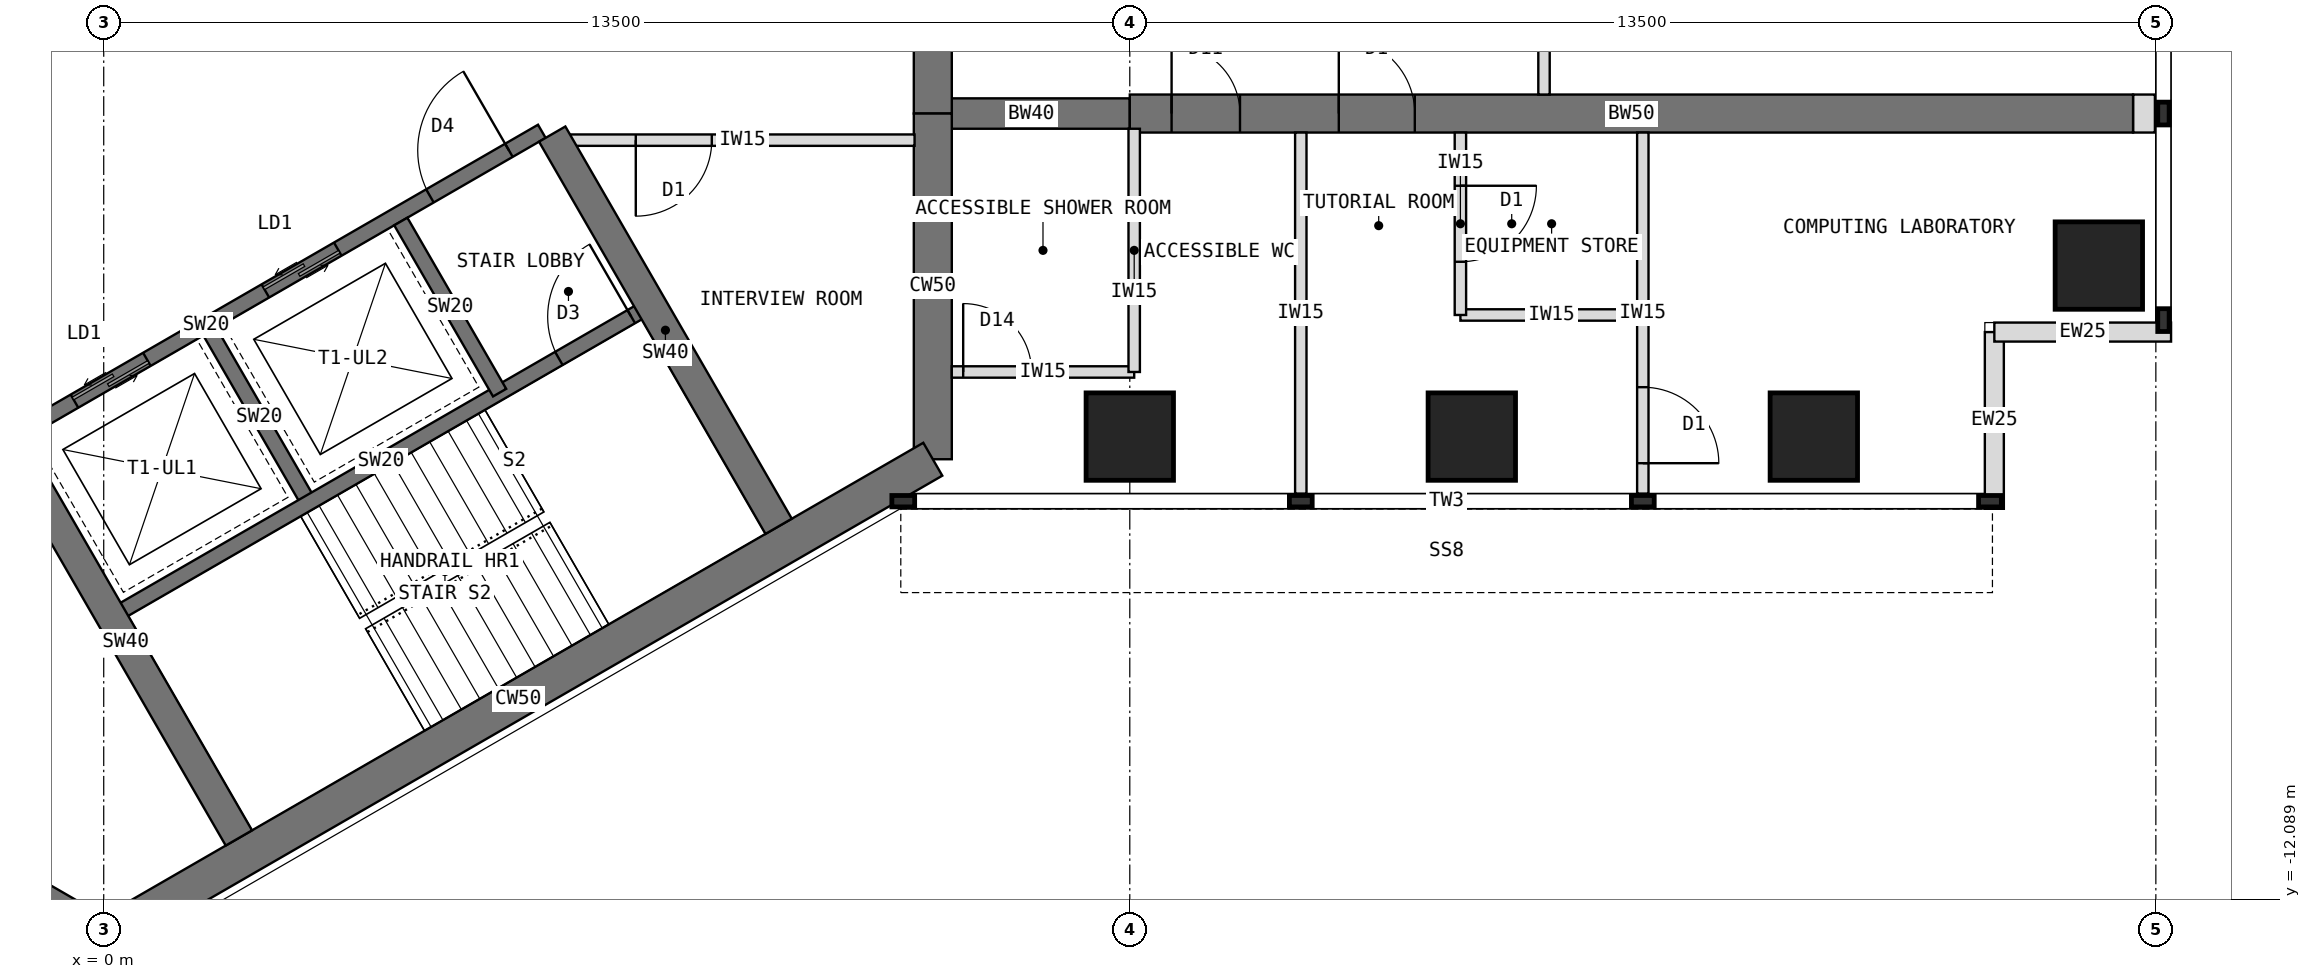
"""IFC4 building model, lengths in metres.
Left out: names, types, materials, properties, quantities, classifications, styles, units other than length and angle.
Written with IfcOpenShell. Run it as: python <this file> out.ifc"""

import sys

from ifc_helpers import new_model, si_unit, direction, frame, frame_2d, origin, origin_2d, place, context, subcontext, project, spatial, rectangle, extrude, element, fill, save


model = new_model("IFC4")
c1 = context("Model", 3, precision=1e-05, world=origin(), true_north=direction((0.0, 1.0)))
c2 = subcontext(c1, "Body", "Model", "MODEL_VIEW")
j1 = project(units=[si_unit("LENGTHUNIT", "METRE"), si_unit("PLANEANGLEUNIT", "RADIAN")], contexts=[c1])
p1 = place(None, origin())
s1 = spatial("IfcSite", under=j1, at=p1, CompositionType="ELEMENT")
p2 = place(p1, origin())
s2 = spatial("IfcBuilding", under=s1, at=p2, CompositionType="ELEMENT")
p3 = place(p2, frame((0.0, 0.0, 206.5)))
s3 = spatial("IfcBuildingStorey", under=s2, at=p3, CompositionType="ELEMENT", Elevation=206.5)
p4 = place(p3, frame((10.908, -6.298, 0.0), z_axis=(0.0, 0.0, 1.0), x_axis=(0.0, 1.0, 0.0)))
e1 = element("IfcWall", 1, at=p4, inside=s3, PredefinedType="SHEAR", context=c2, shape_type="SweptSolid", body=[
    extrude(rectangle(XDim=4.548, YDim=0.5, at=frame_2d((2.274, 0.0))), origin(), (0.0, 0.0, 1.0), 4.0),
])
p5 = place(p3, frame((10.908, -1.75, 0.0), z_axis=(0.0, 0.0, 1.0), x_axis=(0.0, 1.0, 0.0)))
e2 = element("IfcWall", 2, at=p5, inside=s3, PredefinedType="SHEAR", context=c2, shape_type="SweptSolid", body=[
    extrude(rectangle(XDim=3.5, YDim=0.5, at=frame_2d((1.75, 0.0))), origin(), (0.0, 0.0, 1.0), 4.0),
])
p6 = place(p5, frame((0.85, 0.0, 0.0)))
e3 = element("IfcOpeningElement", 3, at=p6, cuts=e2, PredefinedType="OPENING", context=c2, shape_type="SweptSolid", body=[
    extrude(rectangle(XDim=1.8, YDim=2.1, at=frame_2d((0.9, 1.05))), frame((0.0, 0.26, 0.0), z_axis=(0.0, -1.0, 0.0), x_axis=(1.0, 0.0, 0.0)), (0.0, 0.0, 1.0), 0.52),
])
p7 = place(p3, frame((-3.939, -10.322, 0.0), z_axis=(0.0, 0.0, 1.0), x_axis=(0.866011268655, -0.500024481964, 0.0)))
e4 = element("IfcWall", 4, at=p7, inside=s3, PredefinedType="SHEAR", context=c2, shape_type="SweptSolid", body=[
    extrude(rectangle(XDim=4.548, YDim=0.5, at=frame_2d((2.274, 0.0))), origin(), (0.0, 0.0, 1.0), 4.0),
])
p8 = place(p3, frame((0.0, -12.596, 0.0), z_axis=(0.0, 0.0, 1.0), x_axis=(0.866021940709, 0.500005998175, 0.0)))
e5 = element("IfcWall", 5, at=p8, inside=s3, PredefinedType="SHEAR", context=c2, shape_type="SweptSolid", body=[
    extrude(rectangle(XDim=12.596, YDim=0.5, at=frame_2d((6.298, 0.0))), origin(), (0.0, 0.0, 1.0), 4.0),
])
p9 = place(p3, frame((10.908, -1.75, 0.0), z_axis=(0.0, 0.0, 1.0), x_axis=(1.0, 0.0, 0.0)))
e6 = element("IfcWall", 6, at=p9, inside=s3, PredefinedType="SHEAR", context=c2, shape_type="SweptSolid", body=[
    extrude(rectangle(XDim=2.592, YDim=0.4, at=frame_2d((1.296, 0.0))), origin(), (0.0, 0.0, 1.0), 4.0),
])
p10 = place(p3, frame((13.5, -1.75, 0.0), z_axis=(0.0, 0.0, 1.0), x_axis=(1.0, 0.0, 0.0)))
e7 = element("IfcWall", 7, at=p10, inside=s3, PredefinedType="SHEAR", context=c2, shape_type="SweptSolid", body=[
    extrude(rectangle(XDim=13.2, YDim=0.5, at=frame_2d((6.6, 0.0))), origin(), (0.0, 0.0, 1.0), 4.0),
])
p11 = place(p10, frame((0.55, 0.0, 0.0)))
e8 = element("IfcOpeningElement", 8, at=p11, cuts=e7, PredefinedType="OPENING", context=c2, shape_type="SweptSolid", body=[
    extrude(rectangle(XDim=0.9, YDim=2.1, at=frame_2d((0.45, 1.05))), frame((0.0, 0.26, 0.0), z_axis=(0.0, -1.0, 0.0), x_axis=(1.0, 0.0, 0.0)), (0.0, 0.0, 1.0), 0.52),
])
p12 = place(p10, frame((2.75, 0.0, 0.0)))
e9 = element("IfcOpeningElement", 9, at=p12, cuts=e7, PredefinedType="OPENING", context=c2, shape_type="SweptSolid", body=[
    extrude(rectangle(XDim=1.0, YDim=2.1, at=frame_2d((0.5, 1.05))), frame((0.0, 0.26, 0.0), z_axis=(0.0, -1.0, 0.0), x_axis=(1.0, 0.0, 0.0)), (0.0, 0.0, 1.0), 0.52),
])
for number, where, z_axis, x_axis in (
    (10, (13.5, -6.0, 0.0), (0.0, 0.0, 1.0), (1.0, 0.0, 0.0)),
    (11, (18.0, -6.0, 0.0), (0.0, 0.0, 1.0), (1.0, 0.0, 0.0)),
    (12, (22.5, -6.0, 0.0), (0.0, 0.0, 1.0), (1.0, 0.0, 0.0)),
    (13, (26.25, -3.75, 0.0), (0.0, 0.0, 1.0), (1.0, 0.0, 0.0)),
):
    element("IfcColumn", number, at=place(p3, frame(where, z_axis=z_axis, x_axis=x_axis)), inside=s3, PredefinedType="COLUMN", context=c2, shape_type="SweptSolid", body=[
        extrude(rectangle(XDim=1.15, YDim=1.15, at=origin_2d()), origin(), (0.0, 0.0, 1.0), 4.0),
    ])
for number, where, z_axis, x_axis in (
    (14, (24.875, -6.95, 0.0), (0.0, 0.0, 1.0), (0.0, 1.0, 0.0)),
    (15, (24.875, -4.625, 0.0), (0.0, 0.0, 1.0), (1.0, 0.0, 0.0)),
):
    element("IfcWall", number, at=place(p3, frame(where, z_axis=z_axis, x_axis=x_axis)), inside=s3, PredefinedType="STANDARD", context=c2, shape_type="SweptSolid", body=[
        extrude(rectangle(XDim=2.325, YDim=0.25, at=frame_2d((1.163, 0.0))), origin(), (0.0, 0.0, 1.0), 3.8),
    ])
p13 = place(p3, frame((26.7, -1.75, 0.0), z_axis=(0.0, 0.0, 1.0), x_axis=(1.0, 0.0, 0.0)))
e16 = element("IfcWall", 16, at=p13, inside=s3, PredefinedType="PARTITIONING", context=c2, shape_type="SweptSolid", body=[
    extrude(rectangle(XDim=0.288, YDim=0.5, at=frame_2d((0.144, 0.0))), origin(), (0.0, 0.0, 1.0), 3.8),
])
p14 = place(p3, frame((-1.164, -5.984, 0.0), z_axis=(0.0, 0.0, 1.0), x_axis=(0.866026010844, 0.49999894854, 0.0)))
e17 = element("IfcWall", 17, at=p14, inside=s3, PredefinedType="SHEAR", context=c2, shape_type="SweptSolid", body=[
    extrude(rectangle(XDim=8.0, YDim=0.2, at=frame_2d((4.0, 0.0))), origin(), (0.0, 0.0, 1.0), 4.0),
])
p15 = place(p14, frame((6.3, 0.0, 0.0)))
e18 = element("IfcOpeningElement", 18, at=p15, cuts=e17, PredefinedType="OPENING", context=c2, shape_type="SweptSolid", body=[
    extrude(rectangle(XDim=1.2, YDim=2.1, at=frame_2d((0.6, 1.05))), frame((0.0, 0.11, 0.0), z_axis=(0.0, -1.0, 0.0), x_axis=(1.0, 0.0, 0.0)), (0.0, 0.0, 1.0), 0.22),
])
p16 = place(p14, frame((0.9, 0.0, 0.0)))
e19 = element("IfcOpeningElement", 19, at=p16, cuts=e17, PredefinedType="OPENING", context=c2, shape_type="SweptSolid", body=[
    extrude(rectangle(XDim=1.1, YDim=2.2, at=frame_2d((0.55, 1.1))), frame((0.0, 0.11, 0.0), z_axis=(0.0, -1.0, 0.0), x_axis=(1.0, 0.0, 0.0)), (0.0, 0.0, 1.0), 0.22),
])
p17 = place(p14, frame((3.8, 0.0, 0.0)))
e20 = element("IfcOpeningElement", 20, at=p17, cuts=e17, PredefinedType="OPENING", context=c2, shape_type="SweptSolid", body=[
    extrude(rectangle(XDim=1.1, YDim=2.2, at=frame_2d((0.55, 1.1))), frame((0.0, 0.11, 0.0), z_axis=(0.0, -1.0, 0.0), x_axis=(1.0, 0.0, 0.0)), (0.0, 0.0, 1.0), 0.22),
])
p18 = place(p3, frame((1.397, -4.62, 0.0), z_axis=(0.0, 0.0, 1.0), x_axis=(0.499936506574, -0.866062058628, 0.0)))
e21 = element("IfcWall", 21, at=p18, inside=s3, PredefinedType="SHEAR", context=c2, shape_type="SweptSolid", body=[
    extrude(rectangle(XDim=2.6, YDim=0.2, at=frame_2d((1.3, 0.0))), origin(), (0.0, 0.0, 1.0), 4.0),
])
p19 = place(p3, frame((3.909, -3.17, 0.0), z_axis=(0.0, 0.0, 1.0), x_axis=(0.49997716683, -0.86603858612, 0.0)))
e22 = element("IfcWall", 22, at=p19, inside=s3, PredefinedType="SHEAR", context=c2, shape_type="SweptSolid", body=[
    extrude(rectangle(XDim=2.6, YDim=0.2, at=frame_2d((1.3, 0.0))), origin(), (0.0, 0.0, 1.0), 4.0),
])
p20 = place(p3, frame((0.186, -8.322, 0.0), z_axis=(0.0, 0.0, 1.0), x_axis=(0.866026010844, 0.49999894854, 0.0)))
e23 = element("IfcWall", 23, at=p20, inside=s3, PredefinedType="SHEAR", context=c2, shape_type="SweptSolid", body=[
    extrude(rectangle(XDim=8.0, YDim=0.2, at=frame_2d((4.0, 0.0))), origin(), (0.0, 0.0, 1.0), 4.0),
])
p21 = place(p20, frame((6.7, 0.0, 0.0)))
e24 = element("IfcOpeningElement", 24, at=p21, cuts=e23, PredefinedType="OPENING", context=c2, shape_type="SweptSolid", body=[
    extrude(rectangle(XDim=1.1, YDim=2.1, at=frame_2d((0.55, 1.05))), frame((0.0, 0.11, 0.0), z_axis=(0.0, -1.0, 0.0), x_axis=(1.0, 0.0, 0.0)), (0.0, 0.0, 1.0), 0.22),
])
p22 = place(p3, frame((5.901, -2.02, 0.0), z_axis=(0.0, 0.0, 1.0), x_axis=(0.500003832394, -0.86602319114, 0.0)))
e25 = element("IfcWall", 25, at=p22, inside=s3, PredefinedType="SHEAR", context=c2, shape_type="SweptSolid", body=[
    extrude(rectangle(XDim=5.958, YDim=0.4, at=frame_2d((2.979, 0.0))), origin(), (0.0, 0.0, 1.0), 4.0),
])
p23 = place(p3, frame((-1.201, -6.12, 0.0), z_axis=(0.0, 0.0, 1.0), x_axis=(0.500021575205, -0.866012946976, 0.0)))
e26 = element("IfcWall", 26, at=p23, inside=s3, PredefinedType="SHEAR", context=c2, shape_type="SweptSolid", body=[
    extrude(rectangle(XDim=5.958, YDim=0.4, at=frame_2d((2.979, 0.0))), origin(), (0.0, 0.0, 1.0), 4.0),
])
p24 = place(p3, frame((15.75, -2.0, 0.0), z_axis=(0.0, 0.0, 1.0), x_axis=(0.0, -1.0, 0.0)))
e27 = element("IfcWall", 27, at=p24, inside=s3, PredefinedType="PARTITIONING", context=c2, shape_type="SweptSolid", body=[
    extrude(rectangle(XDim=4.75, YDim=0.15, at=frame_2d((2.375, 0.0))), origin(), (0.0, 0.0, 1.0), 3.8),
])
p25 = place(p3, frame((20.25, -2.0, 0.0), z_axis=(0.0, 0.0, 1.0), x_axis=(0.0, -1.0, 0.0)))
e28 = element("IfcWall", 28, at=p25, inside=s3, PredefinedType="PARTITIONING", context=c2, shape_type="SweptSolid", body=[
    extrude(rectangle(XDim=4.75, YDim=0.15, at=frame_2d((2.375, 0.0))), origin(), (0.0, 0.0, 1.0), 3.8),
])
p26 = place(p25, frame((3.35, 0.0, 0.0)))
e29 = element("IfcOpeningElement", 29, at=p26, cuts=e28, PredefinedType="OPENING", context=c2, shape_type="SweptSolid", body=[
    extrude(rectangle(XDim=1.0, YDim=2.1, at=frame_2d((0.5, 1.05))), frame((0.0, 0.085, 0.0), z_axis=(0.0, -1.0, 0.0), x_axis=(1.0, 0.0, 0.0)), (0.0, 0.0, 1.0), 0.17),
])
p27 = place(p3, frame((17.85, -4.4, 0.0), z_axis=(0.0, 0.0, 1.0), x_axis=(1.0, 0.0, 0.0)))
e30 = element("IfcWall", 30, at=p27, inside=s3, PredefinedType="PARTITIONING", context=c2, shape_type="SweptSolid", body=[
    extrude(rectangle(XDim=2.4, YDim=0.15, at=frame_2d((1.2, 0.0))), origin(), (0.0, 0.0, 1.0), 3.8),
])
p28 = place(p3, frame((17.85, -2.0, 0.0), z_axis=(0.0, 0.0, 1.0), x_axis=(0.0, -1.0, 0.0)))
e31 = element("IfcWall", 31, at=p28, inside=s3, PredefinedType="PARTITIONING", context=c2, shape_type="SweptSolid", body=[
    extrude(rectangle(XDim=2.4, YDim=0.15, at=frame_2d((1.2, 0.0))), origin(), (0.0, 0.0, 1.0), 3.8),
])
p29 = place(p28, frame((0.7, 0.0, 0.0)))
e32 = element("IfcOpeningElement", 32, at=p29, cuts=e31, PredefinedType="OPENING", context=c2, shape_type="SweptSolid", body=[
    extrude(rectangle(XDim=1.0, YDim=2.1, at=frame_2d((0.5, 1.05))), frame((0.0, 0.085, 0.0), z_axis=(0.0, -1.0, 0.0), x_axis=(1.0, 0.0, 0.0)), (0.0, 0.0, 1.0), 0.17),
])
p30 = place(p3, frame((11.158, -5.15, 0.0), z_axis=(0.0, 0.0, 1.0), x_axis=(1.0, 0.0, 0.0)))
e33 = element("IfcWall", 33, at=p30, inside=s3, PredefinedType="PARTITIONING", context=c2, shape_type="SweptSolid", body=[
    extrude(rectangle(XDim=2.4, YDim=0.15, at=frame_2d((1.2, 0.0))), origin(), (0.0, 0.0, 1.0), 3.8),
])
p31 = place(p30, frame((0.15, 0.0, 0.0)))
e34 = element("IfcOpeningElement", 34, at=p31, cuts=e33, PredefinedType="OPENING", context=c2, shape_type="SweptSolid", body=[
    extrude(rectangle(XDim=0.9, YDim=2.1, at=frame_2d((0.45, 1.05))), frame((0.0, 0.085, 0.0), z_axis=(0.0, -1.0, 0.0), x_axis=(1.0, 0.0, 0.0)), (0.0, 0.0, 1.0), 0.17),
])
p32 = place(p3, frame((13.558, -1.95, 0.0), z_axis=(0.0, 0.0, 1.0), x_axis=(0.0, -1.0, 0.0)))
e35 = element("IfcWall", 35, at=p32, inside=s3, PredefinedType="PARTITIONING", context=c2, shape_type="SweptSolid", body=[
    extrude(rectangle(XDim=3.2, YDim=0.15, at=frame_2d((1.6, 0.0))), origin(), (0.0, 0.0, 1.0), 3.267),
])
p33 = place(p3, frame((10.668, -2.1, 0.0), z_axis=(0.0, 0.0, 1.0), x_axis=(-1.0, 0.0, 0.0)))
e36 = element("IfcWall", 36, at=p33, inside=s3, PredefinedType="PARTITIONING", context=c2, shape_type="SweptSolid", body=[
    extrude(rectangle(XDim=4.526, YDim=0.15, at=frame_2d((2.263, 0.0))), origin(), (0.0, 0.0, 1.0), 3.8),
])
p34 = place(p33, frame((2.668, 0.0, 0.0)))
e37 = element("IfcOpeningElement", 37, at=p34, cuts=e36, PredefinedType="OPENING", context=c2, shape_type="SweptSolid", body=[
    extrude(rectangle(XDim=1.0, YDim=2.1, at=frame_2d((0.5, 1.05))), frame((0.0, 0.085, 0.0), z_axis=(0.0, -1.0, 0.0), x_axis=(1.0, 0.0, 0.0)), (0.0, 0.0, 1.0), 0.17),
])
p35 = place(p3, frame((18.95, -1.5, 0.0), z_axis=(0.0, 0.0, 1.0), x_axis=(0.0, 1.0, 0.0)))
e38 = element("IfcWall", 38, at=p35, inside=s3, PredefinedType="PARTITIONING", context=c2, shape_type="SweptSolid", body=[
    extrude(rectangle(XDim=3.0, YDim=0.15, at=frame_2d((1.5, 0.0))), origin(), (0.0, 0.0, 1.0), 3.8),
])
p36 = place(p35, frame((1.0, 0.0, 0.0)))
e39 = element("IfcOpeningElement", 39, at=p36, cuts=e38, PredefinedType="OPENING", context=c2, shape_type="SweptSolid", body=[
    extrude(rectangle(XDim=1.0, YDim=2.1, at=frame_2d((0.5, 1.05))), frame((0.0, 0.085, 0.0), z_axis=(0.0, -1.0, 0.0), x_axis=(1.0, 0.0, 0.0)), (0.0, 0.0, 1.0), 0.17),
])
p37 = place(p15, origin())
e40 = element("IfcDoor", 40, at=p37, inside=s3, OperationType="SINGLE_SWING_RIGHT", PredefinedType="DOOR", context=c2, shape_type="SweptSolid", body=[
    extrude(rectangle(XDim=1.2, YDim=2.1, at=frame_2d((0.6, 1.05))), frame((0.0, 0.025, 0.0), z_axis=(0.0, -1.0, 0.0), x_axis=(1.0, 0.0, 0.0)), (0.0, 0.0, 1.0), 0.05),
])
fill(e18, e40)
p38 = place(p16, origin())
e41 = element("IfcDoor", 41, at=p38, inside=s3, OperationType="DOUBLE_DOOR_SLIDING", PredefinedType="DOOR", context=c2, shape_type="SweptSolid", body=[
    extrude(rectangle(XDim=1.1, YDim=2.2, at=frame_2d((0.55, 1.1))), frame((0.0, 0.025, 0.0), z_axis=(0.0, -1.0, 0.0), x_axis=(1.0, 0.0, 0.0)), (0.0, 0.0, 1.0), 0.05),
])
fill(e19, e41)
p39 = place(p17, origin())
e42 = element("IfcDoor", 42, at=p39, inside=s3, OperationType="DOUBLE_DOOR_SLIDING", PredefinedType="DOOR", context=c2, shape_type="SweptSolid", body=[
    extrude(rectangle(XDim=1.1, YDim=2.2, at=frame_2d((0.55, 1.1))), frame((0.0, 0.025, 0.0), z_axis=(0.0, -1.0, 0.0), x_axis=(1.0, 0.0, 0.0)), (0.0, 0.0, 1.0), 0.05),
])
fill(e20, e42)
p40 = place(p21, origin())
e43 = element("IfcDoor", 43, at=p40, inside=s3, OperationType="SINGLE_SWING_RIGHT", PredefinedType="DOOR", context=c2, shape_type="SweptSolid", body=[
    extrude(rectangle(XDim=1.1, YDim=2.1, at=frame_2d((0.55, 1.05))), frame((0.0, 0.025, 0.0), z_axis=(0.0, -1.0, 0.0), x_axis=(1.0, 0.0, 0.0)), (0.0, 0.0, 1.0), 0.05),
])
fill(e24, e43)
p41 = place(p26, origin())
e44 = element("IfcDoor", 44, at=p41, inside=s3, OperationType="SINGLE_SWING_RIGHT", PredefinedType="DOOR", context=c2, shape_type="SweptSolid", body=[
    extrude(rectangle(XDim=1.0, YDim=2.1, at=frame_2d((0.5, 1.05))), frame((0.0, 0.025, 0.0), z_axis=(0.0, -1.0, 0.0), x_axis=(1.0, 0.0, 0.0)), (0.0, 0.0, 1.0), 0.05),
])
fill(e29, e44)
p42 = place(p29, origin())
e45 = element("IfcDoor", 45, at=p42, inside=s3, OperationType="SINGLE_SWING_LEFT", PredefinedType="DOOR", context=c2, shape_type="SweptSolid", body=[
    extrude(rectangle(XDim=1.0, YDim=2.1, at=frame_2d((0.5, 1.05))), frame((0.0, 0.025, 0.0), z_axis=(0.0, -1.0, 0.0), x_axis=(1.0, 0.0, 0.0)), (0.0, 0.0, 1.0), 0.05),
])
fill(e32, e45)
p43 = place(p31, origin())
e46 = element("IfcDoor", 46, at=p43, inside=s3, OperationType="SINGLE_SWING_LEFT", PredefinedType="DOOR", context=c2, shape_type="SweptSolid", body=[
    extrude(rectangle(XDim=0.9, YDim=2.1, at=frame_2d((0.45, 1.05))), frame((0.0, 0.025, 0.0), z_axis=(0.0, -1.0, 0.0), x_axis=(1.0, 0.0, 0.0)), (0.0, 0.0, 1.0), 0.05),
])
fill(e34, e46)
p44 = place(p34, origin())
e47 = element("IfcDoor", 47, at=p44, inside=s3, OperationType="SINGLE_SWING_RIGHT", PredefinedType="DOOR", context=c2, shape_type="SweptSolid", body=[
    extrude(rectangle(XDim=1.0, YDim=2.1, at=frame_2d((0.5, 1.05))), frame((0.0, 0.025, 0.0), z_axis=(0.0, -1.0, 0.0), x_axis=(1.0, 0.0, 0.0)), (0.0, 0.0, 1.0), 0.05),
])
fill(e37, e47)
p45 = place(p11, origin())
e48 = element("IfcDoor", 48, at=p45, inside=s3, OperationType="SINGLE_SWING_LEFT", PredefinedType="DOOR", context=c2, shape_type="SweptSolid", body=[
    extrude(rectangle(XDim=0.9, YDim=2.1, at=frame_2d((0.45, 1.05))), frame((0.0, 0.025, 0.0), z_axis=(0.0, -1.0, 0.0), x_axis=(1.0, 0.0, 0.0)), (0.0, 0.0, 1.0), 0.05),
])
fill(e8, e48)
p46 = place(p12, origin())
e49 = element("IfcDoor", 49, at=p46, inside=s3, OperationType="SINGLE_SWING_LEFT", PredefinedType="DOOR", context=c2, shape_type="SweptSolid", body=[
    extrude(rectangle(XDim=1.0, YDim=2.1, at=frame_2d((0.5, 1.05))), frame((0.0, 0.025, 0.0), z_axis=(0.0, -1.0, 0.0), x_axis=(1.0, 0.0, 0.0)), (0.0, 0.0, 1.0), 0.05),
])
fill(e9, e49)
save(model, sys.argv[1])
